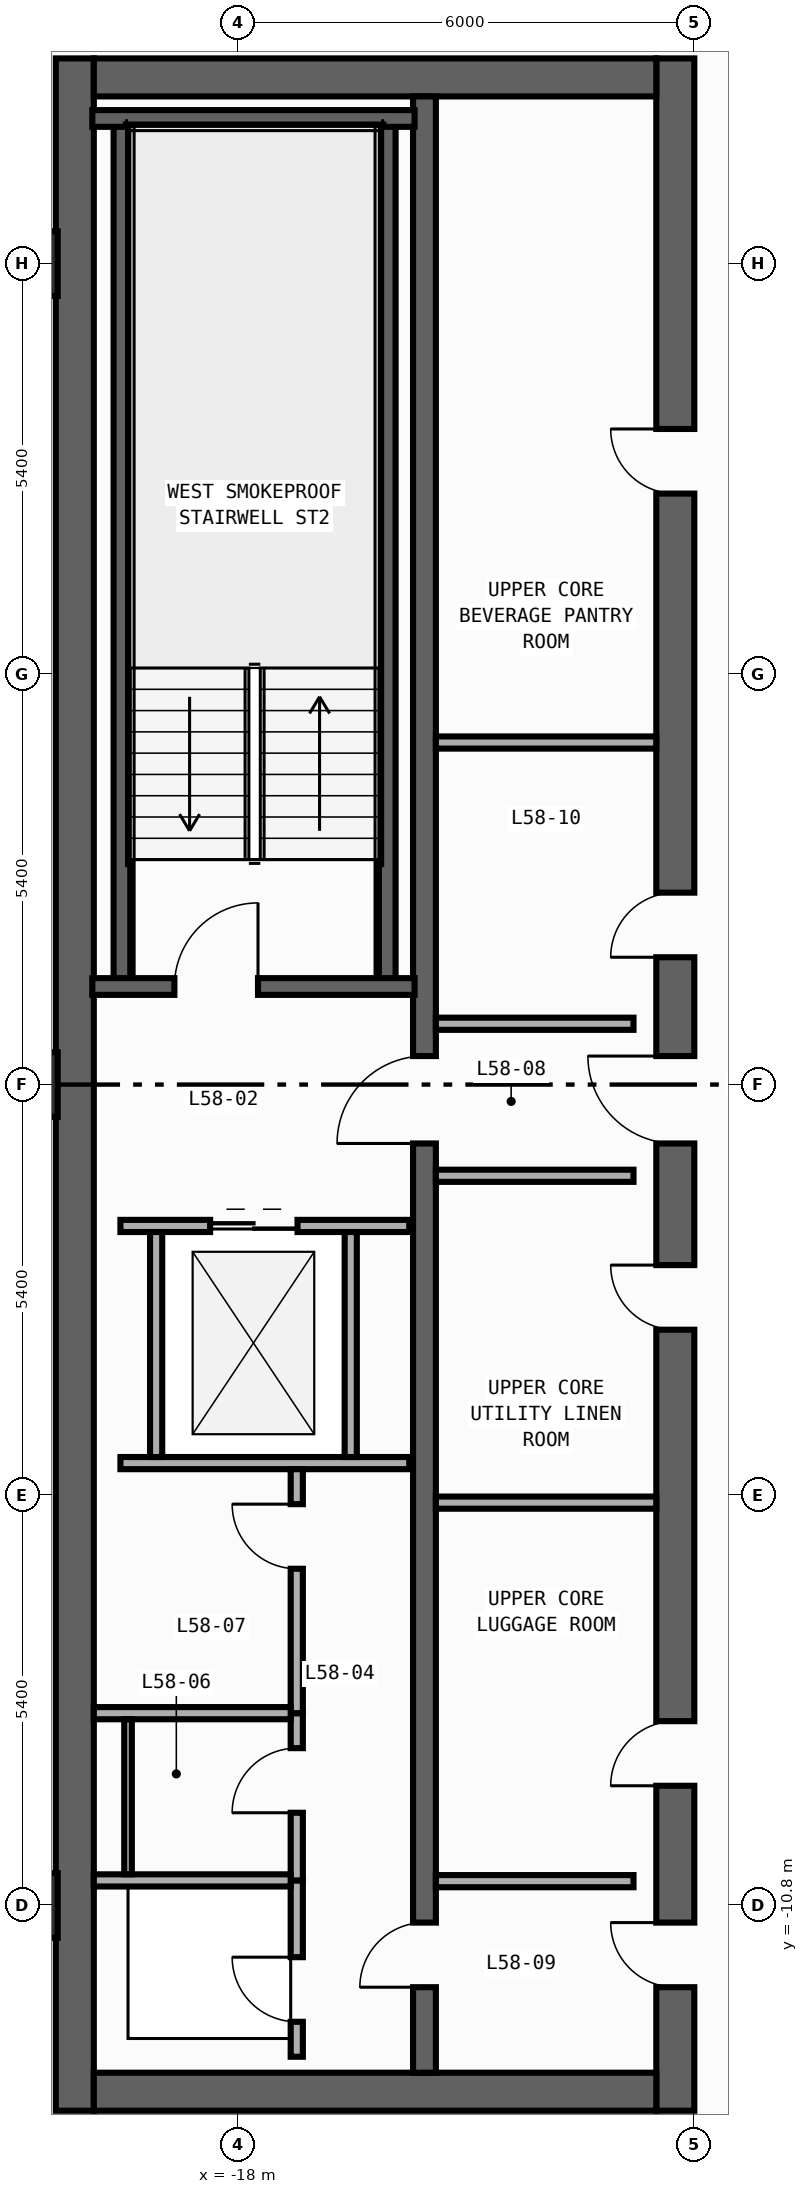
"""IFC4 building model, lengths in metres.
Left out: names, types, materials, properties, quantities, classifications, styles, units other than length and angle.
Written with IfcOpenShell. Run it as: python <this file> out.ifc"""

import sys

from ifc_helpers import new_model, si_unit, direction, frame, frame_2d, origin, origin_2d, place, context, subcontext, project, spatial, rectangle, extrude, element, fill, save


model = new_model("IFC4")
c1 = context("Model", 3, precision=1e-05, world=origin(), true_north=direction((0.0, 1.0)))
c2 = subcontext(c1, "Body", "Model", "MODEL_VIEW")
j1 = project(units=[si_unit("LENGTHUNIT", "METRE"), si_unit("PLANEANGLEUNIT", "RADIAN")], contexts=[c1])
p1 = place(None, origin())
s1 = spatial("IfcSite", under=j1, at=p1, CompositionType="ELEMENT")
p2 = place(p1, origin())
s2 = spatial("IfcBuilding", under=s1, at=p2, CompositionType="ELEMENT")
p3 = place(p2, frame((0.0, 0.0, 247.6)))
s3 = spatial("IfcBuildingStorey", under=s2, at=p3, CompositionType="ELEMENT", Elevation=247.6)
p4 = place(p3, frame((-20.15, -13.5, 0.0), z_axis=(0.0, 0.0, 1.0), x_axis=(0.0, 1.0, 0.0)))
e1 = element("IfcWall", 1, at=p4, inside=s3, PredefinedType="SHEAR", context=c2, shape_type="SweptSolid", body=[
    extrude(rectangle(XDim=27.0, YDim=0.5, at=frame_2d((13.5, 0.0))), origin(), (0.0, 0.0, 1.0), 3.34),
])
p5 = place(p3, frame((-12.25, -13.5, 0.0), z_axis=(0.0, 0.0, 1.0), x_axis=(0.0, 1.0, 0.0)))
e2 = element("IfcWall", 2, at=p5, inside=s3, PredefinedType="SHEAR", context=c2, shape_type="SweptSolid", body=[
    extrude(rectangle(XDim=27.0, YDim=0.5, at=frame_2d((13.5, 0.0))), origin(), (0.0, 0.0, 1.0), 3.34),
])
p6 = place(p5, frame((15.175, 0.0, 0.0)))
e3 = element("IfcOpeningElement", 3, at=p6, cuts=e2, PredefinedType="OPENING", context=c2, shape_type="SweptSolid", body=[
    extrude(rectangle(XDim=0.85, YDim=2.1, at=frame_2d((0.425, 1.05))), frame((0.0, 0.26, 0.0), z_axis=(0.0, -1.0, 0.0), x_axis=(1.0, 0.0, 0.0)), (0.0, 0.0, 1.0), 0.52),
])
p7 = place(p5, frame((21.275, 0.0, 0.0)))
e4 = element("IfcOpeningElement", 4, at=p7, cuts=e2, PredefinedType="OPENING", context=c2, shape_type="SweptSolid", body=[
    extrude(rectangle(XDim=0.85, YDim=2.1, at=frame_2d((0.425, 1.05))), frame((0.0, 0.26, 0.0), z_axis=(0.0, -1.0, 0.0), x_axis=(1.0, 0.0, 0.0)), (0.0, 0.0, 1.0), 0.52),
])
p8 = place(p5, frame((4.275, 0.0, 0.0)))
e5 = element("IfcOpeningElement", 5, at=p8, cuts=e2, PredefinedType="OPENING", context=c2, shape_type="SweptSolid", body=[
    extrude(rectangle(XDim=0.85, YDim=2.1, at=frame_2d((0.425, 1.05))), frame((0.0, 0.26, 0.0), z_axis=(0.0, -1.0, 0.0), x_axis=(1.0, 0.0, 0.0)), (0.0, 0.0, 1.0), 0.52),
])
p9 = place(p5, frame((10.275, 0.0, 0.0)))
e6 = element("IfcOpeningElement", 6, at=p9, cuts=e2, PredefinedType="OPENING", context=c2, shape_type="SweptSolid", body=[
    extrude(rectangle(XDim=0.85, YDim=2.1, at=frame_2d((0.425, 1.05))), frame((0.0, 0.26, 0.0), z_axis=(0.0, -1.0, 0.0), x_axis=(1.0, 0.0, 0.0)), (0.0, 0.0, 1.0), 0.52),
])
p10 = place(p5, frame((12.725, 0.0, 0.0)))
e7 = element("IfcOpeningElement", 7, at=p10, cuts=e2, PredefinedType="OPENING", context=c2, shape_type="SweptSolid", body=[
    extrude(rectangle(XDim=1.15, YDim=2.2, at=frame_2d((0.575, 1.1))), frame((0.0, 0.26, 0.0), z_axis=(0.0, -1.0, 0.0), x_axis=(1.0, 0.0, 0.0)), (0.0, 0.0, 1.0), 0.52),
])
p11 = place(p5, frame((1.625, 0.0, 0.0)))
e8 = element("IfcOpeningElement", 8, at=p11, cuts=e2, PredefinedType="OPENING", context=c2, shape_type="SweptSolid", body=[
    extrude(rectangle(XDim=0.85, YDim=2.1, at=frame_2d((0.425, 1.05))), frame((0.0, 0.26, 0.0), z_axis=(0.0, -1.0, 0.0), x_axis=(1.0, 0.0, 0.0)), (0.0, 0.0, 1.0), 0.52),
])
for number, where, z_axis, x_axis in (
    (9, (-19.9, -13.25, 0.0), (0.0, 0.0, 1.0), (1.0, 0.0, 0.0)),
    (10, (-19.9, 13.25, 0.0), (0.0, 0.0, 1.0), (1.0, 0.0, 0.0)),
):
    element("IfcWall", number, at=place(p3, frame(where, z_axis=z_axis, x_axis=x_axis)), inside=s3, PredefinedType="SHEAR", context=c2, shape_type="SweptSolid", body=[
        extrude(rectangle(XDim=7.4, YDim=0.5, at=frame_2d((3.7, 0.0))), origin(), (0.0, 0.0, 1.0), 3.34),
    ])
p12 = place(p3, frame((-15.55, -13.0, 0.0), z_axis=(0.0, 0.0, 1.0), x_axis=(0.0, 1.0, 0.0)))
e11 = element("IfcWall", 11, at=p12, inside=s3, PredefinedType="SHEAR", context=c2, shape_type="SweptSolid", body=[
    extrude(rectangle(XDim=26.0, YDim=0.3, at=frame_2d((13.0, 0.0))), origin(), (0.0, 0.0, 1.0), 3.34),
])
p13 = place(p12, frame((12.225, 0.0, 0.0)))
e12 = element("IfcOpeningElement", 12, at=p13, cuts=e11, PredefinedType="OPENING", context=c2, shape_type="SweptSolid", body=[
    extrude(rectangle(XDim=1.15, YDim=2.2, at=frame_2d((0.575, 1.1))), frame((0.0, 0.16, 0.0), z_axis=(0.0, -1.0, 0.0), x_axis=(1.0, 0.0, 0.0)), (0.0, 0.0, 1.0), 0.32),
])
p14 = place(p12, frame((1.125, 0.0, 0.0)))
e13 = element("IfcOpeningElement", 13, at=p14, cuts=e11, PredefinedType="OPENING", context=c2, shape_type="SweptSolid", body=[
    extrude(rectangle(XDim=0.85, YDim=2.1, at=frame_2d((0.425, 1.05))), frame((0.0, 0.16, 0.0), z_axis=(0.0, -1.0, 0.0), x_axis=(1.0, 0.0, 0.0)), (0.0, 0.0, 1.0), 0.32),
])
for number, where, z_axis, x_axis in (
    (14, (-16.04, 1.29, 0.0), (0.0, 0.0, 1.0), (0.0, 1.0, 0.0)),
    (15, (-19.53, 1.29, 0.0), (0.0, 0.0, 1.0), (0.0, 1.0, 0.0)),
):
    element("IfcWall", number, at=place(p3, frame(where, z_axis=z_axis, x_axis=x_axis)), inside=s3, PredefinedType="SHEAR", context=c2, shape_type="SweptSolid", body=[
        extrude(rectangle(XDim=11.42, YDim=0.22, at=frame_2d((5.71, 0.0))), origin(), (0.0, 0.0, 1.0), 3.34),
    ])
p15 = place(p3, frame((-19.92, 12.71, 0.0), z_axis=(0.0, 0.0, 1.0), x_axis=(1.0, 0.0, 0.0)))
e16 = element("IfcWall", 16, at=p15, inside=s3, PredefinedType="SHEAR", context=c2, shape_type="SweptSolid", body=[
    extrude(rectangle(XDim=4.24, YDim=0.22, at=frame_2d((2.12, 0.0))), origin(), (0.0, 0.0, 1.0), 3.34),
])
p16 = place(p3, frame((-19.92, 1.29, 0.0), z_axis=(0.0, 0.0, 1.0), x_axis=(1.0, 0.0, 0.0)))
e17 = element("IfcWall", 17, at=p16, inside=s3, PredefinedType="SHEAR", context=c2, shape_type="SweptSolid", body=[
    extrude(rectangle(XDim=4.24, YDim=0.22, at=frame_2d((2.12, 0.0))), origin(), (0.0, 0.0, 1.0), 3.34),
])
p17 = place(p16, frame((1.08, 0.0, 0.0)))
e18 = element("IfcOpeningElement", 18, at=p17, cuts=e17, PredefinedType="OPENING", context=c2, shape_type="SweptSolid", body=[
    extrude(rectangle(XDim=1.1, YDim=2.2, at=frame_2d((0.55, 1.1))), frame((0.0, 0.12, 0.0), z_axis=(0.0, -1.0, 0.0), x_axis=(1.0, 0.0, 0.0)), (0.0, 0.0, 1.0), 0.24),
])
for number, where, z_axis, x_axis in (
    (19, (-20.8, -10.8, 0.0), (0.0, 0.0, 1.0), (1.0, 0.0, 0.0)),
    (20, (-20.8, 0.0, 0.0), (0.0, 0.0, 1.0), (1.0, 0.0, 0.0)),
    (21, (-20.8, 10.8, 0.0), (0.0, 0.0, 1.0), (1.0, 0.0, 0.0)),
):
    element("IfcColumn", number, at=place(p3, frame(where, z_axis=z_axis, x_axis=x_axis)), inside=s3, PredefinedType="COLUMN", context=c2, shape_type="SweptSolid", body=[
        extrude(rectangle(XDim=0.85, YDim=0.85, at=origin_2d()), origin(), (0.0, 0.0, 1.0), 3.6),
    ])
p18 = place(p3, frame((-19.55, -1.86, 0.0), z_axis=(0.0, 0.0, 1.0), x_axis=(1.0, 0.0, 0.0)))
e22 = element("IfcWall", 22, at=p18, inside=s3, PredefinedType="STANDARD", context=c2, shape_type="SweptSolid", body=[
    extrude(rectangle(XDim=3.8, YDim=0.16, at=frame_2d((1.9, 0.0))), origin(), (0.0, 0.0, 1.0), 3.34),
])
p19 = place(p18, frame((1.18, 0.0, 0.0)))
e23 = element("IfcOpeningElement", 23, at=p19, cuts=e22, PredefinedType="OPENING", context=c2, shape_type="SweptSolid", body=[
    extrude(rectangle(XDim=1.15, YDim=2.2, at=frame_2d((0.575, 1.1))), frame((0.0, 0.09, 0.0), z_axis=(0.0, -1.0, 0.0), x_axis=(1.0, 0.0, 0.0)), (0.0, 0.0, 1.0), 0.18),
])
p20 = place(p3, frame((-19.55, -4.98, 0.0), z_axis=(0.0, 0.0, 1.0), x_axis=(1.0, 0.0, 0.0)))
e24 = element("IfcWall", 24, at=p20, inside=s3, PredefinedType="STANDARD", context=c2, shape_type="SweptSolid", body=[
    extrude(rectangle(XDim=3.8, YDim=0.16, at=frame_2d((1.9, 0.0))), origin(), (0.0, 0.0, 1.0), 3.34),
])
for number, where, z_axis, x_axis in (
    (25, (-19.08, -4.9, 0.0), (0.0, 0.0, 1.0), (0.0, 1.0, 0.0)),
    (26, (-16.52, -4.9, 0.0), (0.0, 0.0, 1.0), (0.0, 1.0, 0.0)),
):
    element("IfcWall", number, at=place(p3, frame(where, z_axis=z_axis, x_axis=x_axis)), inside=s3, PredefinedType="STANDARD", context=c2, shape_type="SweptSolid", body=[
        extrude(rectangle(XDim=2.96, YDim=0.16, at=frame_2d((1.48, 0.0))), origin(), (0.0, 0.0, 1.0), 3.34),
    ])
for number, where, z_axis, x_axis in (
    (27, (-15.4, 0.8, 0.0), (0.0, 0.0, 1.0), (1.0, 0.0, 0.0)),
    (28, (-15.4, -1.2, 0.0), (0.0, 0.0, 1.0), (1.0, 0.0, 0.0)),
    (29, (-15.4, -10.48, 0.0), (0.0, 0.0, 1.0), (1.0, 0.0, 0.0)),
):
    element("IfcWall", number, at=place(p3, frame(where, z_axis=z_axis, x_axis=x_axis)), inside=s3, PredefinedType="STANDARD", context=c2, shape_type="SweptSolid", body=[
        extrude(rectangle(XDim=2.6, YDim=0.16, at=frame_2d((1.3, 0.0))), origin(), (0.0, 0.0, 1.0), 3.34),
    ])
p21 = place(p3, frame((-17.23, -12.79, 0.0), z_axis=(0.0, 0.0, 1.0), x_axis=(0.0, 1.0, 0.0)))
e30 = element("IfcWall", 30, at=p21, inside=s3, PredefinedType="PARTITIONING", context=c2, shape_type="SweptSolid", body=[
    extrude(rectangle(XDim=2.32, YDim=0.16, at=frame_2d((1.16, 0.0))), origin(), (0.0, 0.0, 1.0), 3.34),
])
p22 = place(p21, frame((0.46, 0.0, 0.0)))
e31 = element("IfcOpeningElement", 31, at=p22, cuts=e30, PredefinedType="OPENING", context=c2, shape_type="SweptSolid", body=[
    extrude(rectangle(XDim=0.85, YDim=2.1, at=frame_2d((0.425, 1.05))), frame((0.0, 0.09, 0.0), z_axis=(0.0, -1.0, 0.0), x_axis=(1.0, 0.0, 0.0)), (0.0, 0.0, 1.0), 0.18),
])
p23 = place(p3, frame((-17.23, -10.47, 0.0), z_axis=(0.0, 0.0, 1.0), x_axis=(0.0, 1.0, 0.0)))
e32 = element("IfcWall", 32, at=p23, inside=s3, PredefinedType="PARTITIONING", context=c2, shape_type="SweptSolid", body=[
    extrude(rectangle(XDim=2.2, YDim=0.16, at=frame_2d((1.1, 0.0))), origin(), (0.0, 0.0, 1.0), 3.34),
])
p24 = place(p23, frame((0.89, 0.0, 0.0)))
e33 = element("IfcOpeningElement", 33, at=p24, cuts=e32, PredefinedType="OPENING", context=c2, shape_type="SweptSolid", body=[
    extrude(rectangle(XDim=0.85, YDim=2.1, at=frame_2d((0.425, 1.05))), frame((0.0, 0.09, 0.0), z_axis=(0.0, -1.0, 0.0), x_axis=(1.0, 0.0, 0.0)), (0.0, 0.0, 1.0), 0.18),
])
p25 = place(p3, frame((-17.23, -8.27, 0.0), z_axis=(0.0, 0.0, 1.0), x_axis=(0.0, 1.0, 0.0)))
e34 = element("IfcWall", 34, at=p25, inside=s3, PredefinedType="PARTITIONING", context=c2, shape_type="SweptSolid", body=[
    extrude(rectangle(XDim=3.21, YDim=0.16, at=frame_2d((1.605, 0.0))), origin(), (0.0, 0.0, 1.0), 3.34),
])
p26 = place(p25, frame((1.9, 0.0, 0.0)))
e35 = element("IfcOpeningElement", 35, at=p26, cuts=e34, PredefinedType="OPENING", context=c2, shape_type="SweptSolid", body=[
    extrude(rectangle(XDim=0.85, YDim=2.1, at=frame_2d((0.425, 1.05))), frame((0.0, 0.09, 0.0), z_axis=(0.0, -1.0, 0.0), x_axis=(1.0, 0.0, 0.0)), (0.0, 0.0, 1.0), 0.18),
])
for number, where, z_axis, x_axis in (
    (36, (-19.9, -10.47, 0.0), (0.0, 0.0, 1.0), (1.0, 0.0, 0.0)),
    (37, (-19.9, -8.27, 0.0), (0.0, 0.0, 1.0), (1.0, 0.0, 0.0)),
):
    element("IfcWall", number, at=place(p3, frame(where, z_axis=z_axis, x_axis=x_axis)), inside=s3, PredefinedType="PARTITIONING", context=c2, shape_type="SweptSolid", body=[
        extrude(rectangle(XDim=2.59, YDim=0.16, at=frame_2d((1.295, 0.0))), origin(), (0.0, 0.0, 1.0), 3.34),
    ])
for number, where, z_axis, x_axis in (
    (38, (-15.4, 4.5, 0.0), (0.0, 0.0, 1.0), (1.0, 0.0, 0.0)),
    (39, (-15.4, -5.5, 0.0), (0.0, 0.0, 1.0), (1.0, 0.0, 0.0)),
):
    element("IfcWall", number, at=place(p3, frame(where, z_axis=z_axis, x_axis=x_axis)), inside=s3, PredefinedType="PARTITIONING", context=c2, shape_type="SweptSolid", body=[
        extrude(rectangle(XDim=2.9, YDim=0.16, at=frame_2d((1.45, 0.0))), origin(), (0.0, 0.0, 1.0), 3.34),
    ])
p27 = place(p3, frame((-19.45, -10.39, 0.0), z_axis=(0.0, 0.0, 1.0), x_axis=(0.0, 1.0, 0.0)))
e40 = element("IfcWall", 40, at=p27, inside=s3, PredefinedType="PARTITIONING", context=c2, shape_type="SweptSolid", body=[
    extrude(rectangle(XDim=2.04, YDim=0.1, at=frame_2d((1.02, 0.0))), origin(), (0.0, 0.0, 1.0), 3.34),
])
p28 = place(p17, origin())
e41 = element("IfcDoor", 41, at=p28, inside=s3, OperationType="SINGLE_SWING_RIGHT", PredefinedType="DOOR", context=c2, shape_type="SweptSolid", body=[
    extrude(rectangle(XDim=1.1, YDim=2.2, at=frame_2d((0.55, 1.1))), frame((0.0, 0.025, 0.0), z_axis=(0.0, -1.0, 0.0), x_axis=(1.0, 0.0, 0.0)), (0.0, 0.0, 1.0), 0.05),
])
fill(e18, e41)
p29 = place(p6, origin())
e42 = element("IfcDoor", 42, at=p29, inside=s3, OperationType="SINGLE_SWING_LEFT", PredefinedType="DOOR", context=c2, shape_type="SweptSolid", body=[
    extrude(rectangle(XDim=0.85, YDim=2.1, at=frame_2d((0.425, 1.05))), frame((0.0, 0.025, 0.0), z_axis=(0.0, -1.0, 0.0), x_axis=(1.0, 0.0, 0.0)), (0.0, 0.0, 1.0), 0.05),
])
fill(e3, e42)
p30 = place(p7, origin())
e43 = element("IfcDoor", 43, at=p30, inside=s3, OperationType="SINGLE_SWING_RIGHT", PredefinedType="DOOR", context=c2, shape_type="SweptSolid", body=[
    extrude(rectangle(XDim=0.85, YDim=2.1, at=frame_2d((0.425, 1.05))), frame((0.0, 0.025, 0.0), z_axis=(0.0, -1.0, 0.0), x_axis=(1.0, 0.0, 0.0)), (0.0, 0.0, 1.0), 0.05),
])
fill(e4, e43)
p31 = place(p8, origin())
e44 = element("IfcDoor", 44, at=p31, inside=s3, OperationType="SINGLE_SWING_LEFT", PredefinedType="DOOR", context=c2, shape_type="SweptSolid", body=[
    extrude(rectangle(XDim=0.85, YDim=2.1, at=frame_2d((0.425, 1.05))), frame((0.0, 0.025, 0.0), z_axis=(0.0, -1.0, 0.0), x_axis=(1.0, 0.0, 0.0)), (0.0, 0.0, 1.0), 0.05),
])
fill(e5, e44)
p32 = place(p9, origin())
e45 = element("IfcDoor", 45, at=p32, inside=s3, OperationType="SINGLE_SWING_RIGHT", PredefinedType="DOOR", context=c2, shape_type="SweptSolid", body=[
    extrude(rectangle(XDim=0.85, YDim=2.1, at=frame_2d((0.425, 1.05))), frame((0.0, 0.025, 0.0), z_axis=(0.0, -1.0, 0.0), x_axis=(1.0, 0.0, 0.0)), (0.0, 0.0, 1.0), 0.05),
])
fill(e6, e45)
p33 = place(p10, origin())
e46 = element("IfcDoor", 46, at=p33, inside=s3, OperationType="SINGLE_SWING_RIGHT", PredefinedType="DOOR", context=c2, shape_type="SweptSolid", body=[
    extrude(rectangle(XDim=1.15, YDim=2.2, at=frame_2d((0.575, 1.1))), frame((0.0, 0.025, 0.0), z_axis=(0.0, -1.0, 0.0), x_axis=(1.0, 0.0, 0.0)), (0.0, 0.0, 1.0), 0.05),
])
fill(e7, e46)
p34 = place(p13, origin())
e47 = element("IfcDoor", 47, at=p34, inside=s3, OperationType="SINGLE_SWING_LEFT", PredefinedType="DOOR", context=c2, shape_type="SweptSolid", body=[
    extrude(rectangle(XDim=1.15, YDim=2.2, at=frame_2d((0.575, 1.1))), frame((0.0, 0.025, 0.0), z_axis=(0.0, -1.0, 0.0), x_axis=(1.0, 0.0, 0.0)), (0.0, 0.0, 1.0), 0.05),
])
fill(e12, e47)
p35 = place(p11, origin())
e48 = element("IfcDoor", 48, at=p35, inside=s3, OperationType="SINGLE_SWING_RIGHT", PredefinedType="DOOR", context=c2, shape_type="SweptSolid", body=[
    extrude(rectangle(XDim=0.85, YDim=2.1, at=frame_2d((0.425, 1.05))), frame((0.0, 0.025, 0.0), z_axis=(0.0, -1.0, 0.0), x_axis=(1.0, 0.0, 0.0)), (0.0, 0.0, 1.0), 0.05),
])
fill(e8, e48)
p36 = place(p14, origin())
e49 = element("IfcDoor", 49, at=p36, inside=s3, OperationType="SINGLE_SWING_LEFT", PredefinedType="DOOR", context=c2, shape_type="SweptSolid", body=[
    extrude(rectangle(XDim=0.85, YDim=2.1, at=frame_2d((0.425, 1.05))), frame((0.0, 0.025, 0.0), z_axis=(0.0, -1.0, 0.0), x_axis=(1.0, 0.0, 0.0)), (0.0, 0.0, 1.0), 0.05),
])
fill(e13, e49)
p37 = place(p19, origin())
e50 = element("IfcDoor", 50, at=p37, inside=s3, OperationType="DOUBLE_DOOR_SLIDING", PredefinedType="DOOR", context=c2, shape_type="SweptSolid", body=[
    extrude(rectangle(XDim=1.15, YDim=2.2, at=frame_2d((0.575, 1.1))), frame((0.0, 0.025, 0.0), z_axis=(0.0, -1.0, 0.0), x_axis=(1.0, 0.0, 0.0)), (0.0, 0.0, 1.0), 0.05),
])
fill(e23, e50)
p38 = place(p22, origin())
e51 = element("IfcDoor", 51, at=p38, inside=s3, OperationType="SINGLE_SWING_RIGHT", PredefinedType="DOOR", context=c2, shape_type="SweptSolid", body=[
    extrude(rectangle(XDim=0.85, YDim=2.1, at=frame_2d((0.425, 1.05))), frame((0.0, 0.025, 0.0), z_axis=(0.0, -1.0, 0.0), x_axis=(1.0, 0.0, 0.0)), (0.0, 0.0, 1.0), 0.05),
])
fill(e31, e51)
p39 = place(p24, origin())
e52 = element("IfcDoor", 52, at=p39, inside=s3, OperationType="SINGLE_SWING_LEFT", PredefinedType="DOOR", context=c2, shape_type="SweptSolid", body=[
    extrude(rectangle(XDim=0.85, YDim=2.1, at=frame_2d((0.425, 1.05))), frame((0.0, 0.025, 0.0), z_axis=(0.0, -1.0, 0.0), x_axis=(1.0, 0.0, 0.0)), (0.0, 0.0, 1.0), 0.05),
])
fill(e33, e52)
p40 = place(p26, origin())
e53 = element("IfcDoor", 53, at=p40, inside=s3, OperationType="SINGLE_SWING_RIGHT", PredefinedType="DOOR", context=c2, shape_type="SweptSolid", body=[
    extrude(rectangle(XDim=0.85, YDim=2.1, at=frame_2d((0.425, 1.05))), frame((0.0, 0.025, 0.0), z_axis=(0.0, -1.0, 0.0), x_axis=(1.0, 0.0, 0.0)), (0.0, 0.0, 1.0), 0.05),
])
fill(e35, e53)
save(model, sys.argv[1])
